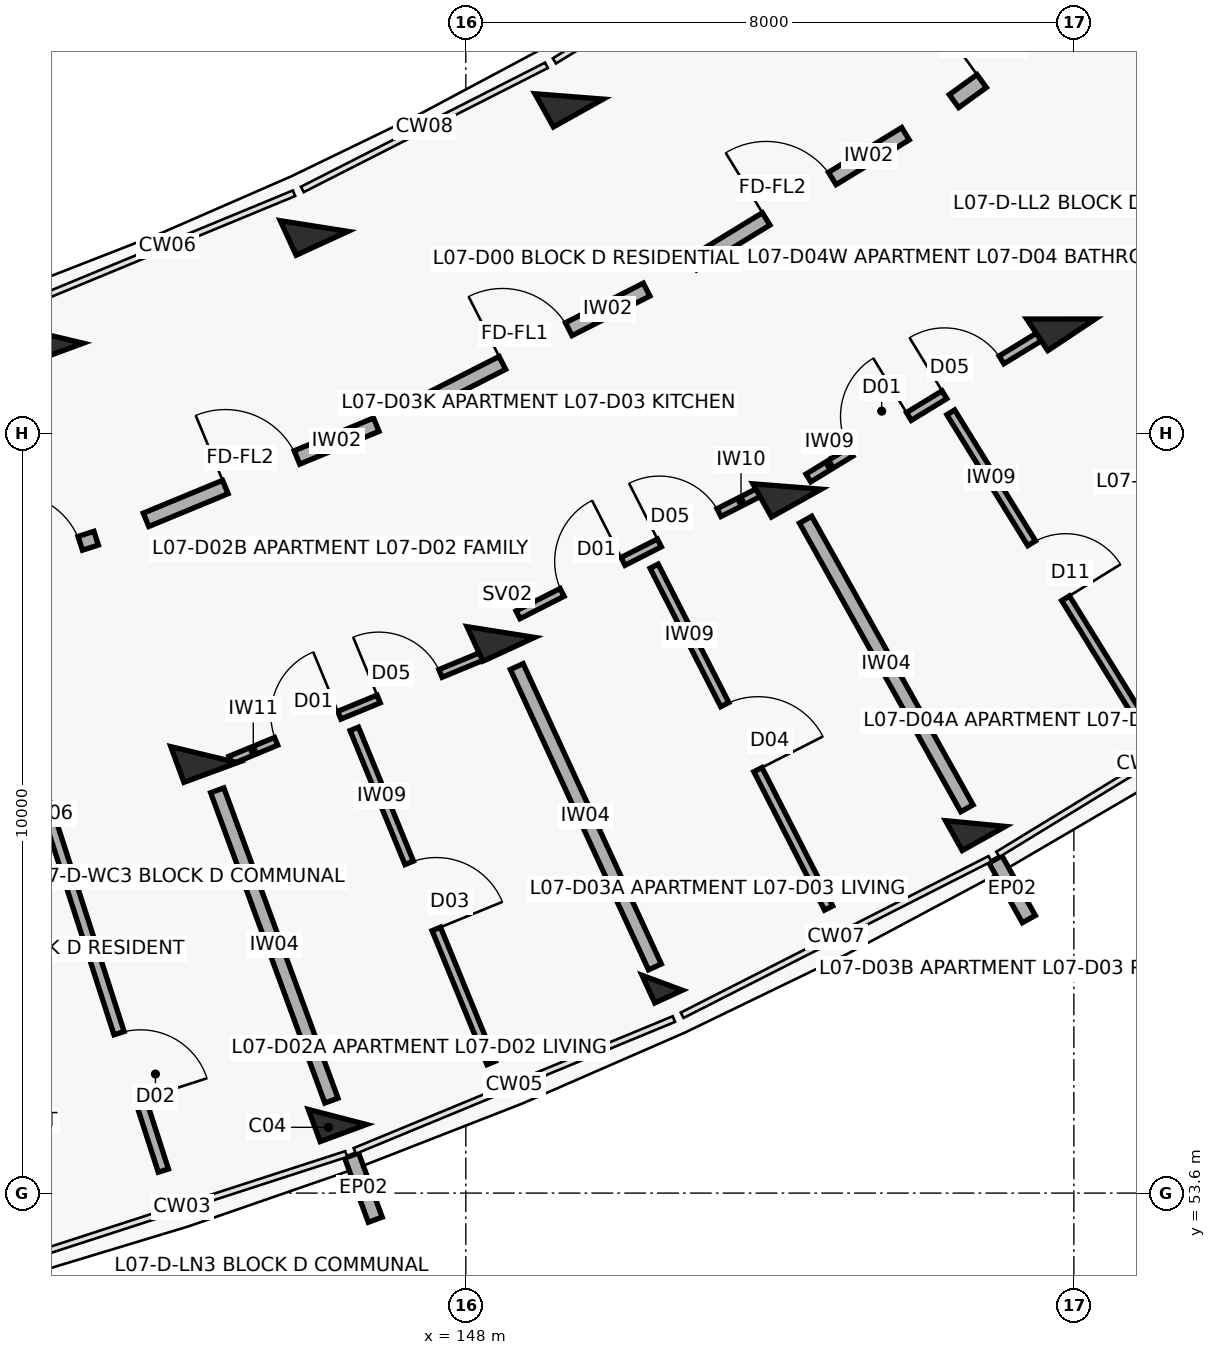
"""IFC4 building model, lengths in metres.
Left out: names, types, materials, properties, quantities, classifications, styles, units other than length and angle.
Written with IfcOpenShell. Run it as: python <this file> out.ifc"""

import sys

from ifc_helpers import new_model, si_unit, direction, frame, frame_2d, origin, origin_2d, place, context, subcontext, project, spatial, rectangle, extrude, element, fill, save


model = new_model("IFC4")
c1 = context("Model", 3, precision=1e-05, world=origin(), true_north=direction((0.0, 1.0)))
c2 = subcontext(c1, "Body", "Model", "MODEL_VIEW")
j1 = project(units=[si_unit("LENGTHUNIT", "METRE"), si_unit("PLANEANGLEUNIT", "RADIAN")], contexts=[c1])
p1 = place(None, origin())
s1 = spatial("IfcSite", under=j1, at=p1, CompositionType="ELEMENT")
p2 = place(p1, origin())
s2 = spatial("IfcBuilding", under=s1, at=p2, CompositionType="ELEMENT")
p3 = place(p2, frame((0.0, 0.0, 23.6)))
s3 = spatial("IfcBuildingStorey", under=s2, at=p3, CompositionType="ELEMENT", Elevation=23.6)
for number, where, z_axis, x_axis in (
    (1, (142.527, 64.887, 0.0), (0.0, 0.0, 1.0), (0.345, -0.938, 0.0)),
    (2, (144.557, 59.369, 0.0), (0.0, 0.0, 1.0), (0.345, -0.938, 0.0)),
):
    element("IfcColumn", number, at=place(p3, frame(where, z_axis=z_axis, x_axis=x_axis)), inside=s3, PredefinedType="COLUMN", context=c2, shape_type="SweptSolid", body=[
        extrude(rectangle(XDim=0.5, YDim=0.75, at=origin_2d()), origin(), (0.0, 0.0, 1.0), 3.1),
    ])
p4 = place(p3, frame((146.311, 54.602, 0.0), z_axis=(0.0, 0.0, 1.0), x_axis=(0.345298198999, -0.93849302276, 0.0)))
e3 = element("IfcColumn", 3, at=p4, inside=s3, PredefinedType="COLUMN", context=c2, shape_type="SweptSolid", body=[
    extrude(rectangle(XDim=0.45, YDim=0.65, at=origin_2d()), origin(), (0.0, 0.0, 1.0), 3.1),
])
for number, where, z_axis, x_axis in (
    (4, (146.004, 66.324, 0.0), (0.0, 0.0, 1.0), (0.418, -0.909, 0.0)),
    (5, (148.461, 60.982, 0.0), (0.0, 0.0, 1.0), (0.418, -0.909, 0.0)),
):
    element("IfcColumn", number, at=place(p3, frame(where, z_axis=z_axis, x_axis=x_axis)), inside=s3, PredefinedType="COLUMN", context=c2, shape_type="SweptSolid", body=[
        extrude(rectangle(XDim=0.5, YDim=0.75, at=origin_2d()), origin(), (0.0, 0.0, 1.0), 3.1),
    ])
p5 = place(p3, frame((150.584, 56.367, 0.0), z_axis=(0.0, 0.0, 1.0), x_axis=(0.417867073801, -0.908508177527, 0.0)))
e6 = element("IfcColumn", 6, at=p5, inside=s3, PredefinedType="COLUMN", context=c2, shape_type="SweptSolid", body=[
    extrude(rectangle(XDim=0.4, YDim=0.4, at=origin_2d()), origin(), (0.0, 0.0, 1.0), 3.1),
])
for number, where, z_axis, x_axis in (
    (7, (149.358, 68.03, 0.0), (0.0, 0.0, 1.0), (0.488, -0.873, 0.0)),
    (8, (152.227, 62.897, 0.0), (0.0, 0.0, 1.0), (0.488, -0.873, 0.0)),
):
    element("IfcColumn", number, at=place(p3, frame(where, z_axis=z_axis, x_axis=x_axis)), inside=s3, PredefinedType="COLUMN", context=c2, shape_type="SweptSolid", body=[
        extrude(rectangle(XDim=0.5, YDim=0.75, at=origin_2d()), origin(), (0.0, 0.0, 1.0), 3.1),
    ])
p6 = place(p3, frame((154.705, 58.462, 0.0), z_axis=(0.0, 0.0, 1.0), x_axis=(0.487859659139, -0.87292207727, 0.0)))
e9 = element("IfcColumn", 9, at=p6, inside=s3, PredefinedType="COLUMN", context=c2, shape_type="SweptSolid", body=[
    extrude(rectangle(XDim=0.45, YDim=0.65, at=origin_2d()), origin(), (0.0, 0.0, 1.0), 3.1),
])
p7 = place(p3, frame((155.831, 65.101, 0.0), z_axis=(0.0, 0.0, 1.0), x_axis=(0.554844427448, -0.83195412213, 0.0)))
e10 = element("IfcColumn", 10, at=p7, inside=s3, PredefinedType="COLUMN", context=c2, shape_type="SweptSolid", body=[
    extrude(rectangle(XDim=0.5, YDim=0.75, at=origin_2d()), origin(), (0.0, 0.0, 1.0), 3.1),
])
for number, where, z_axis, x_axis in (
    (11, (146.498, 54.095, 0.0), (0.0, 0.0, 1.0), (0.345, -0.938, 0.0)),
    (12, (154.969, 57.991, 0.0), (0.0, 0.0, 1.0), (0.488, -0.873, 0.0)),
):
    element("IfcWall", number, at=place(p3, frame(where, z_axis=z_axis, x_axis=x_axis)), inside=s3, PredefinedType="PARAPET", context=c2, shape_type="SweptSolid", body=[
        extrude(rectangle(XDim=0.9, YDim=0.195, at=frame_2d((0.45, 0.0))), origin(), (0.0, 0.0, 1.0), 2.25),
    ])
p8 = place(p3, frame((140.019, 61.208, 0.0), z_axis=(0.0, 0.0, 1.0), x_axis=(0.951323803878, 0.308193154005, 0.0)))
e13 = element("IfcWall", 13, at=p8, inside=s3, PredefinedType="SOLIDWALL", context=c2, shape_type="SweptSolid", body=[
    extrude(rectangle(XDim=3.277, YDim=0.19, at=frame_2d((1.639, 0.0))), origin(), (0.0, 0.0, 1.0), 2.14),
])
p9 = place(p8, frame((0.28, 0.0, 0.0)))
e14 = element("IfcOpeningElement", 14, at=p9, cuts=e13, PredefinedType="OPENING", context=c2, shape_type="SweptSolid", body=[
    extrude(rectangle(XDim=1.12, YDim=2.15, at=frame_2d((0.56, 1.075))), frame((0.0, 0.105, 0.0), z_axis=(0.0, -1.0, 0.0), x_axis=(1.0, 0.0, 0.0)), (0.0, 0.0, 1.0), 0.21),
])
p10 = place(p8, frame((2.107, 0.0, 0.0)))
e15 = element("IfcOpeningElement", 15, at=p10, cuts=e13, PredefinedType="OPENING", context=c2, shape_type="SweptSolid", body=[
    extrude(rectangle(XDim=0.95, YDim=2.1, at=frame_2d((0.475, 1.05))), frame((0.0, 0.105, 0.0), z_axis=(0.0, -1.0, 0.0), x_axis=(1.0, 0.0, 0.0)), (0.0, 0.0, 1.0), 0.21),
])
p11 = place(p3, frame((141.581, 61.462, 0.0), z_axis=(0.0, 0.0, 1.0), x_axis=(0.306824216212, -0.951766200464, 0.0)))
e16 = element("IfcWall", 16, at=p11, inside=s3, PredefinedType="PARTITIONING", context=c2, shape_type="SweptSolid", body=[
    extrude(rectangle(XDim=7.95, YDim=0.14, at=frame_2d((3.975, 0.0))), origin(), (0.0, 0.0, 1.0), 2.14),
])
p12 = place(p11, frame((6.05, 0.0, 0.0)))
e17 = element("IfcOpeningElement", 17, at=p12, cuts=e16, PredefinedType="OPENING", context=c2, shape_type="SweptSolid", body=[
    extrude(rectangle(XDim=0.92, YDim=2.1, at=frame_2d((0.46, 1.05))), frame((0.0, 0.08, 0.0), z_axis=(0.0, -1.0, 0.0), x_axis=(1.0, 0.0, 0.0)), (0.0, 0.0, 1.0), 0.16),
])
p13 = place(p3, frame((143.793, 62.459, 0.0), z_axis=(0.0, 0.0, 1.0), x_axis=(0.924214561665, 0.381873596896, 0.0)))
e18 = element("IfcWall", 18, at=p13, inside=s3, PredefinedType="SOLIDWALL", context=c2, shape_type="SweptSolid", body=[
    extrude(rectangle(XDim=3.277, YDim=0.19, at=frame_2d((1.639, 0.0))), origin(), (0.0, 0.0, 1.0), 2.14),
])
p14 = place(p13, frame((1.128, 0.0, 0.0)))
e19 = element("IfcOpeningElement", 19, at=p14, cuts=e18, PredefinedType="OPENING", context=c2, shape_type="SweptSolid", body=[
    extrude(rectangle(XDim=1.02, YDim=2.15, at=frame_2d((0.51, 1.075))), frame((0.0, 0.105, 0.0), z_axis=(0.0, -1.0, 0.0), x_axis=(1.0, 0.0, 0.0)), (0.0, 0.0, 1.0), 0.21),
])
p15 = place(p3, frame((144.903, 59.296, 0.0), z_axis=(0.0, 0.0, 1.0), x_axis=(0.924207914011, 0.381889685223, 0.0)))
e20 = element("IfcWall", 20, at=p15, inside=s3, PredefinedType="PARTITIONING", context=c2, shape_type="SweptSolid", body=[
    extrude(rectangle(XDim=3.64, YDim=0.11, at=frame_2d((1.82, 0.0))), origin(), (0.0, 0.0, 1.0), 2.14),
])
p16 = place(p15, frame((0.65, 0.0, 0.0)))
e21 = element("IfcOpeningElement", 21, at=p16, cuts=e20, PredefinedType="OPENING", context=c2, shape_type="SweptSolid", body=[
    extrude(rectangle(XDim=0.9, YDim=2.1, at=frame_2d((0.45, 1.05))), frame((0.0, 0.065, 0.0), z_axis=(0.0, -1.0, 0.0), x_axis=(1.0, 0.0, 0.0)), (0.0, 0.0, 1.0), 0.13),
])
p17 = place(p15, frame((2.11, 0.0, 0.0)))
e22 = element("IfcOpeningElement", 22, at=p17, cuts=e20, PredefinedType="OPENING", context=c2, shape_type="SweptSolid", body=[
    extrude(rectangle(XDim=0.88, YDim=2.1, at=frame_2d((0.44, 1.05))), frame((0.0, 0.065, 0.0), z_axis=(0.0, -1.0, 0.0), x_axis=(1.0, 0.0, 0.0)), (0.0, 0.0, 1.0), 0.13),
])
p18 = place(p3, frame((146.533, 59.708, 0.0), z_axis=(0.0, 0.0, 1.0), x_axis=(0.379167145653, -0.925328198888, 0.0)))
e23 = element("IfcWall", 23, at=p18, inside=s3, PredefinedType="PARTITIONING", context=c2, shape_type="SweptSolid", body=[
    extrude(rectangle(XDim=4.75, YDim=0.12, at=frame_2d((2.375, 0.0))), origin(), (0.0, 0.0, 1.0), 2.14),
])
p19 = place(p18, frame((1.905, 0.0, 0.0)))
e24 = element("IfcOpeningElement", 24, at=p19, cuts=e23, PredefinedType="OPENING", context=c2, shape_type="SweptSolid", body=[
    extrude(rectangle(XDim=0.94, YDim=2.1, at=frame_2d((0.47, 1.05))), frame((0.0, 0.07, 0.0), z_axis=(0.0, -1.0, 0.0), x_axis=(1.0, 0.0, 0.0)), (0.0, 0.0, 1.0), 0.14),
])
p20 = place(p3, frame((144.73, 58.9, 0.0), z_axis=(0.0, 0.0, 1.0), x_axis=(0.345273579683, -0.938502080537, 0.0)))
e25 = element("IfcWall", 25, at=p20, inside=s3, PredefinedType="SOLIDWALL", context=c2, shape_type="SweptSolid", body=[
    extrude(rectangle(XDim=4.35, YDim=0.185, at=frame_2d((2.175, 0.0))), origin(), (0.0, 0.0, 1.0), 2.14),
])
p21 = place(p3, frame((147.457, 64.003, 0.0), z_axis=(0.0, 0.0, 1.0), x_axis=(0.891412167565, 0.45319349898, 0.0)))
e26 = element("IfcWall", 26, at=p21, inside=s3, PredefinedType="SOLIDWALL", context=c2, shape_type="SweptSolid", body=[
    extrude(rectangle(XDim=3.277, YDim=0.19, at=frame_2d((1.639, 0.0))), origin(), (0.0, 0.0, 1.0), 2.14),
])
p22 = place(p21, frame((1.148, 0.0, 0.0)))
e27 = element("IfcOpeningElement", 27, at=p22, cuts=e26, PredefinedType="OPENING", context=c2, shape_type="SweptSolid", body=[
    extrude(rectangle(XDim=0.98, YDim=2.15, at=frame_2d((0.49, 1.075))), frame((0.0, 0.105, 0.0), z_axis=(0.0, -1.0, 0.0), x_axis=(1.0, 0.0, 0.0)), (0.0, 0.0, 1.0), 0.21),
])
p23 = place(p3, frame((148.687, 61.209, 0.0), z_axis=(0.0, 0.0, 1.0), x_axis=(0.891396224028, 0.453224857866, 0.0)))
e28 = element("IfcWall", 28, at=p23, inside=s3, PredefinedType="PARTITIONING", context=c2, shape_type="SweptSolid", body=[
    extrude(rectangle(XDim=3.617, YDim=0.115, at=frame_2d((1.808, 0.0))), origin(), (0.0, 0.0, 1.0), 2.14),
])
p24 = place(p23, frame((0.65, 0.0, 0.0)))
e29 = element("IfcOpeningElement", 29, at=p24, cuts=e28, PredefinedType="OPENING", context=c2, shape_type="SweptSolid", body=[
    extrude(rectangle(XDim=0.9, YDim=2.1, at=frame_2d((0.45, 1.05))), frame((0.0, 0.067, 0.0), z_axis=(0.0, -1.0, 0.0), x_axis=(1.0, 0.0, 0.0)), (0.0, 0.0, 1.0), 0.135),
])
p25 = place(p23, frame((2.086, 0.0, 0.0)))
e30 = element("IfcOpeningElement", 30, at=p25, cuts=e28, PredefinedType="OPENING", context=c2, shape_type="SweptSolid", body=[
    extrude(rectangle(XDim=0.88, YDim=2.1, at=frame_2d((0.44, 1.05))), frame((0.0, 0.067, 0.0), z_axis=(0.0, -1.0, 0.0), x_axis=(1.0, 0.0, 0.0)), (0.0, 0.0, 1.0), 0.135),
])
p26 = place(p3, frame((150.478, 61.849, 0.0), z_axis=(0.0, 0.0, 1.0), x_axis=(0.454489129902, -0.890752283635, 0.0)))
e31 = element("IfcWall", 31, at=p26, inside=s3, PredefinedType="PARTITIONING", context=c2, shape_type="SweptSolid", body=[
    extrude(rectangle(XDim=5.05, YDim=0.12, at=frame_2d((2.525, 0.0))), origin(), (0.0, 0.0, 1.0), 2.14),
])
p27 = place(p26, frame((2.045, 0.0, 0.0)))
e32 = element("IfcOpeningElement", 32, at=p27, cuts=e31, PredefinedType="OPENING", context=c2, shape_type="SweptSolid", body=[
    extrude(rectangle(XDim=0.96, YDim=2.1, at=frame_2d((0.48, 1.05))), frame((0.0, 0.07, 0.0), z_axis=(0.0, -1.0, 0.0), x_axis=(1.0, 0.0, 0.0)), (0.0, 0.0, 1.0), 0.14),
])
p28 = place(p3, frame((148.67, 60.528, 0.0), z_axis=(0.0, 0.0, 1.0), x_axis=(0.417837051164, -0.908521985796, 0.0)))
e33 = element("IfcWall", 33, at=p28, inside=s3, PredefinedType="SOLIDWALL", context=c2, shape_type="SweptSolid", body=[
    extrude(rectangle(XDim=4.35, YDim=0.185, at=frame_2d((2.175, 0.0))), origin(), (0.0, 0.0, 1.0), 2.14),
])
p29 = place(p3, frame((150.989, 65.829, 0.0), z_axis=(0.0, 0.0, 1.0), x_axis=(0.853090237845, 0.521763400492, 0.0)))
e34 = element("IfcWall", 34, at=p29, inside=s3, PredefinedType="SOLIDWALL", context=c2, shape_type="SweptSolid", body=[
    extrude(rectangle(XDim=3.277, YDim=0.19, at=frame_2d((1.638, 0.0))), origin(), (0.0, 0.0, 1.0), 2.14),
])
p30 = place(p29, frame((1.128, 0.0, 0.0)))
e35 = element("IfcOpeningElement", 35, at=p30, cuts=e34, PredefinedType="OPENING", context=c2, shape_type="SweptSolid", body=[
    extrude(rectangle(XDim=1.02, YDim=2.15, at=frame_2d((0.51, 1.075))), frame((0.0, 0.105, 0.0), z_axis=(0.0, -1.0, 0.0), x_axis=(1.0, 0.0, 0.0)), (0.0, 0.0, 1.0), 0.21),
])
p31 = place(p3, frame((152.507, 63.01, 0.0), z_axis=(0.0, 0.0, 1.0), x_axis=(0.853110474662, 0.521730311581, 0.0)))
e36 = element("IfcWall", 36, at=p31, inside=s3, PredefinedType="PARTITIONING", context=c2, shape_type="SweptSolid", body=[
    extrude(rectangle(XDim=3.628, YDim=0.12, at=frame_2d((1.814, 0.0))), origin(), (0.0, 0.0, 1.0), 2.14),
])
p32 = place(p31, frame((0.65, 0.0, 0.0)))
e37 = element("IfcOpeningElement", 37, at=p32, cuts=e36, PredefinedType="OPENING", context=c2, shape_type="SweptSolid", body=[
    extrude(rectangle(XDim=0.9, YDim=2.1, at=frame_2d((0.45, 1.05))), frame((0.0, 0.07, 0.0), z_axis=(0.0, -1.0, 0.0), x_axis=(1.0, 0.0, 0.0)), (0.0, 0.0, 1.0), 0.14),
])
p33 = place(p31, frame((2.098, 0.0, 0.0)))
e38 = element("IfcOpeningElement", 38, at=p33, cuts=e36, PredefinedType="OPENING", context=c2, shape_type="SweptSolid", body=[
    extrude(rectangle(XDim=0.88, YDim=2.1, at=frame_2d((0.44, 1.05))), frame((0.0, 0.07, 0.0), z_axis=(0.0, -1.0, 0.0), x_axis=(1.0, 0.0, 0.0)), (0.0, 0.0, 1.0), 0.14),
])
p34 = place(p3, frame((154.38, 63.873, 0.0), z_axis=(0.0, 0.0, 1.0), x_axis=(0.525458935368, -0.850818962672, 0.0)))
e39 = element("IfcWall", 39, at=p34, inside=s3, PredefinedType="PARTITIONING", context=c2, shape_type="SweptSolid", body=[
    extrude(rectangle(XDim=4.9, YDim=0.12, at=frame_2d((2.45, 0.0))), origin(), (0.0, 0.0, 1.0), 2.14),
])
p35 = place(p34, frame((2.025, 0.0, 0.0)))
e40 = element("IfcOpeningElement", 40, at=p35, cuts=e39, PredefinedType="OPENING", context=c2, shape_type="SweptSolid", body=[
    extrude(rectangle(XDim=0.85, YDim=2.1, at=frame_2d((0.425, 1.05))), frame((0.0, 0.07, 0.0), z_axis=(0.0, -1.0, 0.0), x_axis=(1.0, 0.0, 0.0)), (0.0, 0.0, 1.0), 0.14),
])
p36 = place(p3, frame((152.471, 62.46, 0.0), z_axis=(0.0, 0.0, 1.0), x_axis=(0.487866639184, -0.872918176218, 0.0)))
e41 = element("IfcWall", 41, at=p36, inside=s3, PredefinedType="SOLIDWALL", context=c2, shape_type="SweptSolid", body=[
    extrude(rectangle(XDim=4.35, YDim=0.185, at=frame_2d((2.175, 0.0))), origin(), (0.0, 0.0, 1.0), 2.14),
])
p37 = place(p3, frame((154.423, 67.968, 0.0), z_axis=(0.0, 0.0, 1.0), x_axis=(0.809516127005, 0.587097641043, 0.0)))
e42 = element("IfcWall", 42, at=p37, inside=s3, PredefinedType="SOLIDWALL", context=c2, shape_type="SweptSolid", body=[
    extrude(rectangle(XDim=3.137, YDim=0.21, at=frame_2d((1.569, 0.0))), origin(), (0.0, 0.0, 1.0), 2.14),
])
p38 = place(p37, frame((0.45, 0.0, 0.0)))
e43 = element("IfcOpeningElement", 43, at=p38, cuts=e42, PredefinedType="OPENING", context=c2, shape_type="SweptSolid", body=[
    extrude(rectangle(XDim=1.1, YDim=2.15, at=frame_2d((0.55, 1.075))), frame((0.0, 0.115, 0.0), z_axis=(0.0, -1.0, 0.0), x_axis=(1.0, 0.0, 0.0)), (0.0, 0.0, 1.0), 0.23),
])
p39 = place(p37, frame((1.567, 0.0, 0.0)))
e44 = element("IfcOpeningElement", 44, at=p39, cuts=e42, PredefinedType="OPENING", context=c2, shape_type="SweptSolid", body=[
    extrude(rectangle(XDim=1.12, YDim=2.15, at=frame_2d((0.56, 1.075))), frame((0.0, 0.115, 0.0), z_axis=(0.0, -1.0, 0.0), x_axis=(1.0, 0.0, 0.0)), (0.0, 0.0, 1.0), 0.23),
])
p40 = place(p10, origin())
e45 = element("IfcDoor", 45, at=p40, inside=s3, OperationType="SINGLE_SWING_LEFT", PredefinedType="DOOR", context=c2, shape_type="SweptSolid", body=[
    extrude(rectangle(XDim=0.95, YDim=2.1, at=frame_2d((0.475, 1.05))), frame((0.0, 0.025, 0.0), z_axis=(0.0, -1.0, 0.0), x_axis=(1.0, 0.0, 0.0)), (0.0, 0.0, 1.0), 0.05),
])
fill(e15, e45)
p41 = place(p12, origin())
e46 = element("IfcDoor", 46, at=p41, inside=s3, OperationType="SINGLE_SWING_RIGHT", PredefinedType="DOOR", context=c2, shape_type="SweptSolid", body=[
    extrude(rectangle(XDim=0.92, YDim=2.1, at=frame_2d((0.46, 1.05))), frame((0.0, 0.025, 0.0), z_axis=(0.0, -1.0, 0.0), x_axis=(1.0, 0.0, 0.0)), (0.0, 0.0, 1.0), 0.05),
])
fill(e17, e46)
p42 = place(p14, origin())
e47 = element("IfcDoor", 47, at=p42, inside=s3, OperationType="SINGLE_SWING_LEFT", PredefinedType="DOOR", context=c2, shape_type="SweptSolid", body=[
    extrude(rectangle(XDim=1.02, YDim=2.15, at=frame_2d((0.51, 1.075))), frame((0.0, 0.025, 0.0), z_axis=(0.0, -1.0, 0.0), x_axis=(1.0, 0.0, 0.0)), (0.0, 0.0, 1.0), 0.05),
])
fill(e19, e47)
p43 = place(p16, origin())
e48 = element("IfcDoor", 48, at=p43, inside=s3, OperationType="SINGLE_SWING_RIGHT", PredefinedType="DOOR", context=c2, shape_type="SweptSolid", body=[
    extrude(rectangle(XDim=0.9, YDim=2.1, at=frame_2d((0.45, 1.05))), frame((0.0, 0.025, 0.0), z_axis=(0.0, -1.0, 0.0), x_axis=(1.0, 0.0, 0.0)), (0.0, 0.0, 1.0), 0.05),
])
fill(e21, e48)
p44 = place(p17, origin())
e49 = element("IfcDoor", 49, at=p44, inside=s3, OperationType="SINGLE_SWING_LEFT", PredefinedType="DOOR", context=c2, shape_type="SweptSolid", body=[
    extrude(rectangle(XDim=0.88, YDim=2.1, at=frame_2d((0.44, 1.05))), frame((0.0, 0.025, 0.0), z_axis=(0.0, -1.0, 0.0), x_axis=(1.0, 0.0, 0.0)), (0.0, 0.0, 1.0), 0.05),
])
fill(e22, e49)
p45 = place(p19, origin())
e50 = element("IfcDoor", 50, at=p45, inside=s3, OperationType="SINGLE_SWING_RIGHT", PredefinedType="DOOR", context=c2, shape_type="SweptSolid", body=[
    extrude(rectangle(XDim=0.94, YDim=2.1, at=frame_2d((0.47, 1.05))), frame((0.0, 0.025, 0.0), z_axis=(0.0, -1.0, 0.0), x_axis=(1.0, 0.0, 0.0)), (0.0, 0.0, 1.0), 0.05),
])
fill(e24, e50)
p46 = place(p22, origin())
e51 = element("IfcDoor", 51, at=p46, inside=s3, OperationType="SINGLE_SWING_LEFT", PredefinedType="DOOR", context=c2, shape_type="SweptSolid", body=[
    extrude(rectangle(XDim=0.98, YDim=2.15, at=frame_2d((0.49, 1.075))), frame((0.0, 0.025, 0.0), z_axis=(0.0, -1.0, 0.0), x_axis=(1.0, 0.0, 0.0)), (0.0, 0.0, 1.0), 0.05),
])
fill(e27, e51)
p47 = place(p24, origin())
e52 = element("IfcDoor", 52, at=p47, inside=s3, OperationType="SINGLE_SWING_RIGHT", PredefinedType="DOOR", context=c2, shape_type="SweptSolid", body=[
    extrude(rectangle(XDim=0.9, YDim=2.1, at=frame_2d((0.45, 1.05))), frame((0.0, 0.025, 0.0), z_axis=(0.0, -1.0, 0.0), x_axis=(1.0, 0.0, 0.0)), (0.0, 0.0, 1.0), 0.05),
])
fill(e29, e52)
p48 = place(p25, origin())
e53 = element("IfcDoor", 53, at=p48, inside=s3, OperationType="SINGLE_SWING_LEFT", PredefinedType="DOOR", context=c2, shape_type="SweptSolid", body=[
    extrude(rectangle(XDim=0.88, YDim=2.1, at=frame_2d((0.44, 1.05))), frame((0.0, 0.025, 0.0), z_axis=(0.0, -1.0, 0.0), x_axis=(1.0, 0.0, 0.0)), (0.0, 0.0, 1.0), 0.05),
])
fill(e30, e53)
p49 = place(p27, origin())
e54 = element("IfcDoor", 54, at=p49, inside=s3, OperationType="SINGLE_SWING_RIGHT", PredefinedType="DOOR", context=c2, shape_type="SweptSolid", body=[
    extrude(rectangle(XDim=0.96, YDim=2.1, at=frame_2d((0.48, 1.05))), frame((0.0, 0.025, 0.0), z_axis=(0.0, -1.0, 0.0), x_axis=(1.0, 0.0, 0.0)), (0.0, 0.0, 1.0), 0.05),
])
fill(e32, e54)
p50 = place(p30, origin())
e55 = element("IfcDoor", 55, at=p50, inside=s3, OperationType="SINGLE_SWING_LEFT", PredefinedType="DOOR", context=c2, shape_type="SweptSolid", body=[
    extrude(rectangle(XDim=1.02, YDim=2.15, at=frame_2d((0.51, 1.075))), frame((0.0, 0.025, 0.0), z_axis=(0.0, -1.0, 0.0), x_axis=(1.0, 0.0, 0.0)), (0.0, 0.0, 1.0), 0.05),
])
fill(e35, e55)
p51 = place(p32, origin())
e56 = element("IfcDoor", 56, at=p51, inside=s3, OperationType="SINGLE_SWING_RIGHT", PredefinedType="DOOR", context=c2, shape_type="SweptSolid", body=[
    extrude(rectangle(XDim=0.9, YDim=2.1, at=frame_2d((0.45, 1.05))), frame((0.0, 0.025, 0.0), z_axis=(0.0, -1.0, 0.0), x_axis=(1.0, 0.0, 0.0)), (0.0, 0.0, 1.0), 0.05),
])
fill(e37, e56)
p52 = place(p33, origin())
e57 = element("IfcDoor", 57, at=p52, inside=s3, OperationType="SINGLE_SWING_LEFT", PredefinedType="DOOR", context=c2, shape_type="SweptSolid", body=[
    extrude(rectangle(XDim=0.88, YDim=2.1, at=frame_2d((0.44, 1.05))), frame((0.0, 0.025, 0.0), z_axis=(0.0, -1.0, 0.0), x_axis=(1.0, 0.0, 0.0)), (0.0, 0.0, 1.0), 0.05),
])
fill(e38, e57)
p53 = place(p35, origin())
e58 = element("IfcDoor", 58, at=p53, inside=s3, OperationType="SINGLE_SWING_RIGHT", PredefinedType="DOOR", context=c2, shape_type="SweptSolid", body=[
    extrude(rectangle(XDim=0.85, YDim=2.1, at=frame_2d((0.425, 1.05))), frame((0.0, 0.025, 0.0), z_axis=(0.0, -1.0, 0.0), x_axis=(1.0, 0.0, 0.0)), (0.0, 0.0, 1.0), 0.05),
])
fill(e40, e58)
p54 = place(p38, origin())
e59 = element("IfcDoor", 59, at=p54, inside=s3, OperationType="SINGLE_SWING_LEFT", PredefinedType="DOOR", context=c2, shape_type="SweptSolid", body=[
    extrude(rectangle(XDim=1.1, YDim=2.15, at=frame_2d((0.55, 1.075))), frame((0.0, 0.025, 0.0), z_axis=(0.0, -1.0, 0.0), x_axis=(1.0, 0.0, 0.0)), (0.0, 0.0, 1.0), 0.05),
])
fill(e43, e59)
save(model, sys.argv[1])
